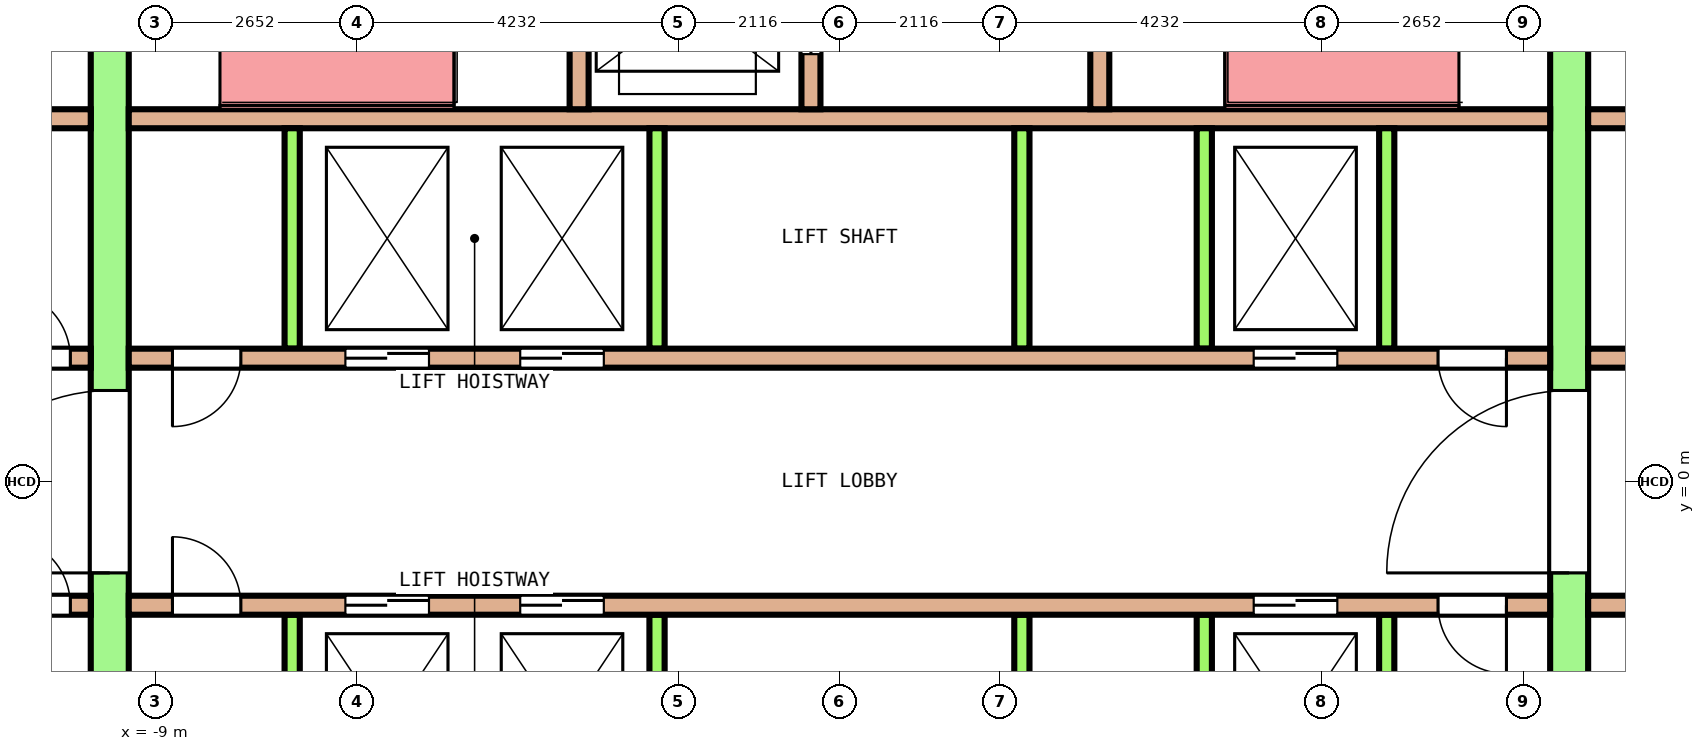
"""IFC4 building model, lengths in metres.
Left out: names, types, materials, properties, quantities, classifications, styles, units other than length and angle.
Written with IfcOpenShell. Run it as: python <this file> out.ifc"""

import sys

from ifc_helpers import new_model, si_unit, direction, frame, frame_2d, origin, place, context, subcontext, project, spatial, rectangle, extrude, element, fill, save


model = new_model("IFC4")
c1 = context("Model", 3, precision=1e-05, world=origin(), true_north=direction((0.0, 1.0)))
c2 = subcontext(c1, "Body", "Model", "MODEL_VIEW")
j1 = project(units=[si_unit("LENGTHUNIT", "METRE"), si_unit("PLANEANGLEUNIT", "RADIAN")], contexts=[c1])
p1 = place(None, origin())
s1 = spatial("IfcSite", under=j1, at=p1, CompositionType="ELEMENT")
p2 = place(p1, origin())
s2 = spatial("IfcBuilding", under=s1, at=p2, CompositionType="ELEMENT")
p3 = place(p2, frame((0.0, 0.0, 184.8)))
s3 = spatial("IfcBuildingStorey", under=s2, at=p3, CompositionType="ELEMENT", Elevation=184.8)
p4 = place(p3, frame((-9.6, -7.75, 0.0), z_axis=(0.0, 0.0, 1.0), x_axis=(0.0, 1.0, 0.0)))
e1 = element("IfcWall", 1, at=p4, inside=s3, PredefinedType="SHEAR", context=c2, shape_type="SweptSolid", body=[
    extrude(rectangle(XDim=15.5, YDim=0.5, at=frame_2d((7.75, 0.0))), origin(), (0.0, 0.0, 1.0), 4.1),
])
p5 = place(p4, frame((6.55, 0.0, 0.0)))
e2 = element("IfcOpeningElement", 2, at=p5, cuts=e1, PredefinedType="OPENING", context=c2, shape_type="SweptSolid", body=[
    extrude(rectangle(XDim=2.4, YDim=2.1, at=frame_2d((1.2, 1.05))), frame((0.0, 0.26, 0.0), z_axis=(0.0, -1.0, 0.0), x_axis=(1.0, 0.0, 0.0)), (0.0, 0.0, 1.0), 0.52),
])
p6 = place(p4, frame((13.45, 0.0, 0.0)))
e3 = element("IfcOpeningElement", 3, at=p6, cuts=e1, PredefinedType="OPENING", context=c2, shape_type="SweptSolid", body=[
    extrude(rectangle(XDim=1.2, YDim=2.1, at=frame_2d((0.6, 1.05))), frame((0.0, 0.26, 0.0), z_axis=(0.0, -1.0, 0.0), x_axis=(1.0, 0.0, 0.0)), (0.0, 0.0, 1.0), 0.52),
])
p7 = place(p4, frame((0.85, 0.0, 0.0)))
e4 = element("IfcOpeningElement", 4, at=p7, cuts=e1, PredefinedType="OPENING", context=c2, shape_type="SweptSolid", body=[
    extrude(rectangle(XDim=1.2, YDim=2.1, at=frame_2d((0.6, 1.05))), frame((0.0, 0.26, 0.0), z_axis=(0.0, -1.0, 0.0), x_axis=(1.0, 0.0, 0.0)), (0.0, 0.0, 1.0), 0.52),
])
p8 = place(p3, frame((9.6, -7.75, 0.0), z_axis=(0.0, 0.0, 1.0), x_axis=(0.0, 1.0, 0.0)))
e5 = element("IfcWall", 5, at=p8, inside=s3, PredefinedType="SHEAR", context=c2, shape_type="SweptSolid", body=[
    extrude(rectangle(XDim=15.5, YDim=0.5, at=frame_2d((7.75, 0.0))), origin(), (0.0, 0.0, 1.0), 4.1),
])
p9 = place(p8, frame((6.55, 0.0, 0.0)))
e6 = element("IfcOpeningElement", 6, at=p9, cuts=e5, PredefinedType="OPENING", context=c2, shape_type="SweptSolid", body=[
    extrude(rectangle(XDim=2.4, YDim=2.1, at=frame_2d((1.2, 1.05))), frame((0.0, 0.26, 0.0), z_axis=(0.0, -1.0, 0.0), x_axis=(1.0, 0.0, 0.0)), (0.0, 0.0, 1.0), 0.52),
])
p10 = place(p8, frame((13.45, 0.0, 0.0)))
e7 = element("IfcOpeningElement", 7, at=p10, cuts=e5, PredefinedType="OPENING", context=c2, shape_type="SweptSolid", body=[
    extrude(rectangle(XDim=1.2, YDim=2.1, at=frame_2d((0.6, 1.05))), frame((0.0, 0.26, 0.0), z_axis=(0.0, -1.0, 0.0), x_axis=(1.0, 0.0, 0.0)), (0.0, 0.0, 1.0), 0.52),
])
p11 = place(p8, frame((0.95, 0.0, 0.0)))
e8 = element("IfcOpeningElement", 8, at=p11, cuts=e5, PredefinedType="OPENING", context=c2, shape_type="SweptSolid", body=[
    extrude(rectangle(XDim=1.0, YDim=2.1, at=frame_2d((0.5, 1.05))), frame((0.0, 0.26, 0.0), z_axis=(0.0, -1.0, 0.0), x_axis=(1.0, 0.0, 0.0)), (0.0, 0.0, 1.0), 0.52),
])
p12 = place(p3, frame((-12.85, 1.625, 0.0), z_axis=(0.0, 0.0, 1.0), x_axis=(1.0, 0.0, 0.0)))
e9 = element("IfcWall", 9, at=p12, inside=s3, PredefinedType="SOLIDWALL", context=c2, shape_type="SweptSolid", body=[
    extrude(rectangle(XDim=3.0, YDim=0.25, at=frame_2d((1.5, 0.0))), origin(), (0.0, 0.0, 1.0), 4.1),
])
p13 = place(p12, frame((0.269, 0.0, 0.0)))
e10 = element("IfcOpeningElement", 10, at=p13, cuts=e9, PredefinedType="OPENING", context=c2, shape_type="SweptSolid", body=[
    extrude(rectangle(XDim=0.9, YDim=2.1, at=frame_2d((0.45, 1.05))), frame((0.0, 0.135, 0.0), z_axis=(0.0, -1.0, 0.0), x_axis=(1.0, 0.0, 0.0)), (0.0, 0.0, 1.0), 0.27),
])
p14 = place(p12, frame((1.831, 0.0, 0.0)))
e11 = element("IfcOpeningElement", 11, at=p14, cuts=e9, PredefinedType="OPENING", context=c2, shape_type="SweptSolid", body=[
    extrude(rectangle(XDim=0.9, YDim=2.1, at=frame_2d((0.45, 1.05))), frame((0.0, 0.135, 0.0), z_axis=(0.0, -1.0, 0.0), x_axis=(1.0, 0.0, 0.0)), (0.0, 0.0, 1.0), 0.27),
])
p15 = place(p3, frame((-9.35, 1.625, 0.0), z_axis=(0.0, 0.0, 1.0), x_axis=(1.0, 0.0, 0.0)))
e12 = element("IfcWall", 12, at=p15, inside=s3, PredefinedType="SOLIDWALL", context=c2, shape_type="SweptSolid", body=[
    extrude(rectangle(XDim=18.7, YDim=0.25, at=frame_2d((9.35, 0.0))), origin(), (0.0, 0.0, 1.0), 4.1),
])
p16 = place(p15, frame((2.85, 0.0, 0.0)))
e13 = element("IfcOpeningElement", 13, at=p16, cuts=e12, PredefinedType="OPENING", context=c2, shape_type="SweptSolid", body=[
    extrude(rectangle(XDim=1.1, YDim=2.1, at=frame_2d((0.55, 1.05))), frame((0.0, 0.135, 0.0), z_axis=(0.0, -1.0, 0.0), x_axis=(1.0, 0.0, 0.0)), (0.0, 0.0, 1.0), 0.27),
])
p17 = place(p15, frame((5.15, 0.0, 0.0)))
e14 = element("IfcOpeningElement", 14, at=p17, cuts=e12, PredefinedType="OPENING", context=c2, shape_type="SweptSolid", body=[
    extrude(rectangle(XDim=1.1, YDim=2.1, at=frame_2d((0.55, 1.05))), frame((0.0, 0.135, 0.0), z_axis=(0.0, -1.0, 0.0), x_axis=(1.0, 0.0, 0.0)), (0.0, 0.0, 1.0), 0.27),
])
p18 = place(p15, frame((14.8, 0.0, 0.0)))
e15 = element("IfcOpeningElement", 15, at=p18, cuts=e12, PredefinedType="OPENING", context=c2, shape_type="SweptSolid", body=[
    extrude(rectangle(XDim=1.1, YDim=2.1, at=frame_2d((0.55, 1.05))), frame((0.0, 0.135, 0.0), z_axis=(0.0, -1.0, 0.0), x_axis=(1.0, 0.0, 0.0)), (0.0, 0.0, 1.0), 0.27),
])
p19 = place(p15, frame((0.575, 0.0, 0.0)))
e16 = element("IfcOpeningElement", 16, at=p19, cuts=e12, PredefinedType="OPENING", context=c2, shape_type="SweptSolid", body=[
    extrude(rectangle(XDim=0.9, YDim=2.1, at=frame_2d((0.45, 1.05))), frame((0.0, 0.135, 0.0), z_axis=(0.0, -1.0, 0.0), x_axis=(1.0, 0.0, 0.0)), (0.0, 0.0, 1.0), 0.27),
])
p20 = place(p15, frame((17.225, 0.0, 0.0)))
e17 = element("IfcOpeningElement", 17, at=p20, cuts=e12, PredefinedType="OPENING", context=c2, shape_type="SweptSolid", body=[
    extrude(rectangle(XDim=0.9, YDim=2.1, at=frame_2d((0.45, 1.05))), frame((0.0, 0.135, 0.0), z_axis=(0.0, -1.0, 0.0), x_axis=(1.0, 0.0, 0.0)), (0.0, 0.0, 1.0), 0.27),
])
p21 = place(p3, frame((9.85, 1.625, 0.0), z_axis=(0.0, 0.0, 1.0), x_axis=(1.0, 0.0, 0.0)))
e18 = element("IfcWall", 18, at=p21, inside=s3, PredefinedType="SOLIDWALL", context=c2, shape_type="SweptSolid", body=[
    extrude(rectangle(XDim=3.0, YDim=0.25, at=frame_2d((1.5, 0.0))), origin(), (0.0, 0.0, 1.0), 4.1),
])
p22 = place(p21, frame((1.05, 0.0, 0.0)))
e19 = element("IfcOpeningElement", 19, at=p22, cuts=e18, PredefinedType="OPENING", context=c2, shape_type="SweptSolid", body=[
    extrude(rectangle(XDim=0.9, YDim=2.1, at=frame_2d((0.45, 1.05))), frame((0.0, 0.135, 0.0), z_axis=(0.0, -1.0, 0.0), x_axis=(1.0, 0.0, 0.0)), (0.0, 0.0, 1.0), 0.27),
])
p23 = place(p3, frame((-12.85, 4.775, 0.0), z_axis=(0.0, 0.0, 1.0), x_axis=(1.0, 0.0, 0.0)))
e20 = element("IfcWall", 20, at=p23, inside=s3, PredefinedType="SOLIDWALL", context=c2, shape_type="SweptSolid", body=[
    extrude(rectangle(XDim=3.0, YDim=0.25, at=frame_2d((1.5, 0.0))), origin(), (0.0, 0.0, 1.0), 4.1),
])
p24 = place(p3, frame((-9.35, 4.775, 0.0), z_axis=(0.0, 0.0, 1.0), x_axis=(1.0, 0.0, 0.0)))
e21 = element("IfcWall", 21, at=p24, inside=s3, PredefinedType="SOLIDWALL", context=c2, shape_type="SweptSolid", body=[
    extrude(rectangle(XDim=18.7, YDim=0.25, at=frame_2d((9.35, 0.0))), origin(), (0.0, 0.0, 1.0), 4.1),
])
p25 = place(p3, frame((9.85, 4.775, 0.0), z_axis=(0.0, 0.0, 1.0), x_axis=(1.0, 0.0, 0.0)))
e22 = element("IfcWall", 22, at=p25, inside=s3, PredefinedType="SOLIDWALL", context=c2, shape_type="SweptSolid", body=[
    extrude(rectangle(XDim=3.0, YDim=0.25, at=frame_2d((1.5, 0.0))), origin(), (0.0, 0.0, 1.0), 4.1),
])
for number, where, z_axis, x_axis in (
    (23, (-7.2, 1.75, 0.0), (0.0, 0.0, 1.0), (0.0, 1.0, 0.0)),
    (24, (-2.4, 1.75, 0.0), (0.0, 0.0, 1.0), (0.0, 1.0, 0.0)),
    (25, (2.4, 1.75, 0.0), (0.0, 0.0, 1.0), (0.0, 1.0, 0.0)),
    (26, (4.8, 1.75, 0.0), (0.0, 0.0, 1.0), (0.0, 1.0, 0.0)),
    (27, (7.2, 1.75, 0.0), (0.0, 0.0, 1.0), (0.0, 1.0, 0.0)),
):
    element("IfcWall", number, at=place(p3, frame(where, z_axis=z_axis, x_axis=x_axis)), inside=s3, PredefinedType="SOLIDWALL", context=c2, shape_type="SweptSolid", body=[
        extrude(rectangle(XDim=2.9, YDim=0.2, at=frame_2d((1.45, 0.0))), origin(), (0.0, 0.0, 1.0), 4.1),
    ])
p26 = place(p3, frame((-12.85, -1.625, 0.0), z_axis=(0.0, 0.0, 1.0), x_axis=(1.0, 0.0, 0.0)))
e28 = element("IfcWall", 28, at=p26, inside=s3, PredefinedType="SOLIDWALL", context=c2, shape_type="SweptSolid", body=[
    extrude(rectangle(XDim=3.0, YDim=0.25, at=frame_2d((1.5, 0.0))), origin(), (0.0, 0.0, 1.0), 4.1),
])
p27 = place(p26, frame((0.269, 0.0, 0.0)))
e29 = element("IfcOpeningElement", 29, at=p27, cuts=e28, PredefinedType="OPENING", context=c2, shape_type="SweptSolid", body=[
    extrude(rectangle(XDim=0.9, YDim=2.1, at=frame_2d((0.45, 1.05))), frame((0.0, 0.135, 0.0), z_axis=(0.0, -1.0, 0.0), x_axis=(1.0, 0.0, 0.0)), (0.0, 0.0, 1.0), 0.27),
])
p28 = place(p26, frame((1.831, 0.0, 0.0)))
e30 = element("IfcOpeningElement", 30, at=p28, cuts=e28, PredefinedType="OPENING", context=c2, shape_type="SweptSolid", body=[
    extrude(rectangle(XDim=0.9, YDim=2.1, at=frame_2d((0.45, 1.05))), frame((0.0, 0.135, 0.0), z_axis=(0.0, -1.0, 0.0), x_axis=(1.0, 0.0, 0.0)), (0.0, 0.0, 1.0), 0.27),
])
p29 = place(p3, frame((-9.35, -1.625, 0.0), z_axis=(0.0, 0.0, 1.0), x_axis=(1.0, 0.0, 0.0)))
e31 = element("IfcWall", 31, at=p29, inside=s3, PredefinedType="SOLIDWALL", context=c2, shape_type="SweptSolid", body=[
    extrude(rectangle(XDim=18.7, YDim=0.25, at=frame_2d((9.35, 0.0))), origin(), (0.0, 0.0, 1.0), 4.1),
])
p30 = place(p29, frame((2.85, 0.0, 0.0)))
e32 = element("IfcOpeningElement", 32, at=p30, cuts=e31, PredefinedType="OPENING", context=c2, shape_type="SweptSolid", body=[
    extrude(rectangle(XDim=1.1, YDim=2.1, at=frame_2d((0.55, 1.05))), frame((0.0, 0.135, 0.0), z_axis=(0.0, -1.0, 0.0), x_axis=(1.0, 0.0, 0.0)), (0.0, 0.0, 1.0), 0.27),
])
p31 = place(p29, frame((5.15, 0.0, 0.0)))
e33 = element("IfcOpeningElement", 33, at=p31, cuts=e31, PredefinedType="OPENING", context=c2, shape_type="SweptSolid", body=[
    extrude(rectangle(XDim=1.1, YDim=2.1, at=frame_2d((0.55, 1.05))), frame((0.0, 0.135, 0.0), z_axis=(0.0, -1.0, 0.0), x_axis=(1.0, 0.0, 0.0)), (0.0, 0.0, 1.0), 0.27),
])
p32 = place(p29, frame((14.8, 0.0, 0.0)))
e34 = element("IfcOpeningElement", 34, at=p32, cuts=e31, PredefinedType="OPENING", context=c2, shape_type="SweptSolid", body=[
    extrude(rectangle(XDim=1.1, YDim=2.1, at=frame_2d((0.55, 1.05))), frame((0.0, 0.135, 0.0), z_axis=(0.0, -1.0, 0.0), x_axis=(1.0, 0.0, 0.0)), (0.0, 0.0, 1.0), 0.27),
])
p33 = place(p29, frame((0.575, 0.0, 0.0)))
e35 = element("IfcOpeningElement", 35, at=p33, cuts=e31, PredefinedType="OPENING", context=c2, shape_type="SweptSolid", body=[
    extrude(rectangle(XDim=0.9, YDim=2.1, at=frame_2d((0.45, 1.05))), frame((0.0, 0.135, 0.0), z_axis=(0.0, -1.0, 0.0), x_axis=(1.0, 0.0, 0.0)), (0.0, 0.0, 1.0), 0.27),
])
p34 = place(p29, frame((17.225, 0.0, 0.0)))
e36 = element("IfcOpeningElement", 36, at=p34, cuts=e31, PredefinedType="OPENING", context=c2, shape_type="SweptSolid", body=[
    extrude(rectangle(XDim=0.9, YDim=2.1, at=frame_2d((0.45, 1.05))), frame((0.0, 0.135, 0.0), z_axis=(0.0, -1.0, 0.0), x_axis=(1.0, 0.0, 0.0)), (0.0, 0.0, 1.0), 0.27),
])
p35 = place(p3, frame((9.85, -1.625, 0.0), z_axis=(0.0, 0.0, 1.0), x_axis=(1.0, 0.0, 0.0)))
e37 = element("IfcWall", 37, at=p35, inside=s3, PredefinedType="SOLIDWALL", context=c2, shape_type="SweptSolid", body=[
    extrude(rectangle(XDim=3.0, YDim=0.25, at=frame_2d((1.5, 0.0))), origin(), (0.0, 0.0, 1.0), 4.1),
])
p36 = place(p35, frame((1.05, 0.0, 0.0)))
e38 = element("IfcOpeningElement", 38, at=p36, cuts=e37, PredefinedType="OPENING", context=c2, shape_type="SweptSolid", body=[
    extrude(rectangle(XDim=0.9, YDim=2.1, at=frame_2d((0.45, 1.05))), frame((0.0, 0.135, 0.0), z_axis=(0.0, -1.0, 0.0), x_axis=(1.0, 0.0, 0.0)), (0.0, 0.0, 1.0), 0.27),
])
for number, where, z_axis, x_axis in (
    (39, (-7.2, -4.65, 0.0), (0.0, 0.0, 1.0), (0.0, 1.0, 0.0)),
    (40, (-2.4, -4.65, 0.0), (0.0, 0.0, 1.0), (0.0, 1.0, 0.0)),
    (41, (2.4, -4.65, 0.0), (0.0, 0.0, 1.0), (0.0, 1.0, 0.0)),
    (42, (4.8, -4.65, 0.0), (0.0, 0.0, 1.0), (0.0, 1.0, 0.0)),
    (43, (7.2, -4.65, 0.0), (0.0, 0.0, 1.0), (0.0, 1.0, 0.0)),
):
    element("IfcWall", number, at=place(p3, frame(where, z_axis=z_axis, x_axis=x_axis)), inside=s3, PredefinedType="SOLIDWALL", context=c2, shape_type="SweptSolid", body=[
        extrude(rectangle(XDim=2.9, YDim=0.2, at=frame_2d((1.45, 0.0))), origin(), (0.0, 0.0, 1.0), 4.1),
    ])
p37 = place(p3, frame((-3.425, 4.9, 0.0), z_axis=(0.0, 0.0, 1.0), x_axis=(0.0, 1.0, 0.0)))
e44 = element("IfcWall", 44, at=p37, inside=s3, PredefinedType="SOLIDWALL", context=c2, shape_type="SweptSolid", body=[
    extrude(rectangle(XDim=2.85, YDim=0.25, at=frame_2d((1.425, 0.0))), origin(), (0.0, 0.0, 1.0), 4.1),
])
p38 = place(p3, frame((-0.375, 4.9, 0.0), z_axis=(0.0, 0.0, 1.0), x_axis=(0.0, 1.0, 0.0)))
e45 = element("IfcWall", 45, at=p38, inside=s3, PredefinedType="SOLIDWALL", context=c2, shape_type="SweptSolid", body=[
    extrude(rectangle(XDim=2.85, YDim=0.25, at=frame_2d((1.425, 0.0))), origin(), (0.0, 0.0, 1.0), 4.1),
])
p39 = place(p38, frame((0.725, 0.0, 0.0)))
e46 = element("IfcOpeningElement", 46, at=p39, cuts=e45, PredefinedType="OPENING", context=c2, shape_type="SweptSolid", body=[
    extrude(rectangle(XDim=1.4, YDim=2.1, at=frame_2d((0.7, 1.05))), frame((0.0, 0.135, 0.0), z_axis=(0.0, -1.0, 0.0), x_axis=(1.0, 0.0, 0.0)), (0.0, 0.0, 1.0), 0.27),
])
p40 = place(p3, frame((3.425, 4.9, 0.0), z_axis=(0.0, 0.0, 1.0), x_axis=(0.0, 1.0, 0.0)))
e47 = element("IfcWall", 47, at=p40, inside=s3, PredefinedType="SOLIDWALL", context=c2, shape_type="SweptSolid", body=[
    extrude(rectangle(XDim=2.85, YDim=0.25, at=frame_2d((1.425, 0.0))), origin(), (0.0, 0.0, 1.0), 4.1),
])
p41 = place(p16, origin())
e48 = element("IfcDoor", 48, at=p41, inside=s3, OperationType="DOUBLE_DOOR_SLIDING", PredefinedType="DOOR", context=c2, shape_type="SweptSolid", body=[
    extrude(rectangle(XDim=1.1, YDim=2.1, at=frame_2d((0.55, 1.05))), frame((0.0, 0.075, 0.0), z_axis=(0.0, -1.0, 0.0), x_axis=(1.0, 0.0, 0.0)), (0.0, 0.0, 1.0), 0.15),
])
fill(e13, e48)
p42 = place(p17, origin())
e49 = element("IfcDoor", 49, at=p42, inside=s3, OperationType="DOUBLE_DOOR_SLIDING", PredefinedType="DOOR", context=c2, shape_type="SweptSolid", body=[
    extrude(rectangle(XDim=1.1, YDim=2.1, at=frame_2d((0.55, 1.05))), frame((0.0, 0.075, 0.0), z_axis=(0.0, -1.0, 0.0), x_axis=(1.0, 0.0, 0.0)), (0.0, 0.0, 1.0), 0.15),
])
fill(e14, e49)
p43 = place(p18, origin())
e50 = element("IfcDoor", 50, at=p43, inside=s3, OperationType="DOUBLE_DOOR_SLIDING", PredefinedType="DOOR", context=c2, shape_type="SweptSolid", body=[
    extrude(rectangle(XDim=1.1, YDim=2.1, at=frame_2d((0.55, 1.05))), frame((0.0, 0.075, 0.0), z_axis=(0.0, -1.0, 0.0), x_axis=(1.0, 0.0, 0.0)), (0.0, 0.0, 1.0), 0.15),
])
fill(e15, e50)
p44 = place(p30, origin())
e51 = element("IfcDoor", 51, at=p44, inside=s3, OperationType="DOUBLE_DOOR_SLIDING", PredefinedType="DOOR", context=c2, shape_type="SweptSolid", body=[
    extrude(rectangle(XDim=1.1, YDim=2.1, at=frame_2d((0.55, 1.05))), frame((0.0, 0.075, 0.0), z_axis=(0.0, -1.0, 0.0), x_axis=(1.0, 0.0, 0.0)), (0.0, 0.0, 1.0), 0.15),
])
fill(e32, e51)
p45 = place(p31, origin())
e52 = element("IfcDoor", 52, at=p45, inside=s3, OperationType="DOUBLE_DOOR_SLIDING", PredefinedType="DOOR", context=c2, shape_type="SweptSolid", body=[
    extrude(rectangle(XDim=1.1, YDim=2.1, at=frame_2d((0.55, 1.05))), frame((0.0, 0.075, 0.0), z_axis=(0.0, -1.0, 0.0), x_axis=(1.0, 0.0, 0.0)), (0.0, 0.0, 1.0), 0.15),
])
fill(e33, e52)
p46 = place(p32, origin())
e53 = element("IfcDoor", 53, at=p46, inside=s3, OperationType="DOUBLE_DOOR_SLIDING", PredefinedType="DOOR", context=c2, shape_type="SweptSolid", body=[
    extrude(rectangle(XDim=1.1, YDim=2.1, at=frame_2d((0.55, 1.05))), frame((0.0, 0.075, 0.0), z_axis=(0.0, -1.0, 0.0), x_axis=(1.0, 0.0, 0.0)), (0.0, 0.0, 1.0), 0.15),
])
fill(e34, e53)
p47 = place(p39, origin())
e54 = element("IfcDoor", 54, at=p47, inside=s3, OperationType="DOUBLE_DOOR_SLIDING", PredefinedType="DOOR", context=c2, shape_type="SweptSolid", body=[
    extrude(rectangle(XDim=1.4, YDim=2.1, at=frame_2d((0.7, 1.05))), frame((0.0, 0.075, 0.0), z_axis=(0.0, -1.0, 0.0), x_axis=(1.0, 0.0, 0.0)), (0.0, 0.0, 1.0), 0.15),
])
fill(e46, e54)
p48 = place(p5, origin())
e55 = element("IfcDoor", 55, at=p48, inside=s3, OperationType="DOUBLE_DOOR_SINGLE_SWING", PredefinedType="DOOR", context=c2, shape_type="SweptSolid", body=[
    extrude(rectangle(XDim=2.4, YDim=2.1, at=frame_2d((1.2, 1.05))), frame((0.0, 0.2, 0.0), z_axis=(0.0, -1.0, 0.0), x_axis=(1.0, 0.0, 0.0)), (0.0, 0.0, 1.0), 0.4),
])
fill(e2, e55)
p49 = place(p9, origin())
e56 = element("IfcDoor", 56, at=p49, inside=s3, OperationType="DOUBLE_DOOR_SINGLE_SWING", PredefinedType="DOOR", context=c2, shape_type="SweptSolid", body=[
    extrude(rectangle(XDim=2.4, YDim=2.1, at=frame_2d((1.2, 1.05))), frame((0.0, 0.2, 0.0), z_axis=(0.0, -1.0, 0.0), x_axis=(1.0, 0.0, 0.0)), (0.0, 0.0, 1.0), 0.4),
])
fill(e6, e56)
p50 = place(p14, origin())
e57 = element("IfcDoor", 57, at=p50, inside=s3, OperationType="SINGLE_SWING_LEFT", PredefinedType="DOOR", context=c2, shape_type="SweptSolid", body=[
    extrude(rectangle(XDim=0.9, YDim=2.1, at=frame_2d((0.45, 1.05))), frame((0.0, 0.075, 0.0), z_axis=(0.0, -1.0, 0.0), x_axis=(1.0, 0.0, 0.0)), (0.0, 0.0, 1.0), 0.15),
])
fill(e11, e57)
p51 = place(p19, origin())
e58 = element("IfcDoor", 58, at=p51, inside=s3, OperationType="SINGLE_SWING_RIGHT", PredefinedType="DOOR", context=c2, shape_type="SweptSolid", body=[
    extrude(rectangle(XDim=0.9, YDim=2.1, at=frame_2d((0.45, 1.05))), frame((0.0, 0.075, 0.0), z_axis=(0.0, -1.0, 0.0), x_axis=(1.0, 0.0, 0.0)), (0.0, 0.0, 1.0), 0.15),
])
fill(e16, e58)
p52 = place(p20, origin())
e59 = element("IfcDoor", 59, at=p52, inside=s3, OperationType="SINGLE_SWING_LEFT", PredefinedType="DOOR", context=c2, shape_type="SweptSolid", body=[
    extrude(rectangle(XDim=0.9, YDim=2.1, at=frame_2d((0.45, 1.05))), frame((0.0, 0.075, 0.0), z_axis=(0.0, -1.0, 0.0), x_axis=(1.0, 0.0, 0.0)), (0.0, 0.0, 1.0), 0.15),
])
fill(e17, e59)
p53 = place(p28, origin())
e60 = element("IfcDoor", 60, at=p53, inside=s3, OperationType="SINGLE_SWING_RIGHT", PredefinedType="DOOR", context=c2, shape_type="SweptSolid", body=[
    extrude(rectangle(XDim=0.9, YDim=2.1, at=frame_2d((0.45, 1.05))), frame((0.0, 0.075, 0.0), z_axis=(0.0, -1.0, 0.0), x_axis=(1.0, 0.0, 0.0)), (0.0, 0.0, 1.0), 0.15),
])
fill(e30, e60)
p54 = place(p33, origin())
e61 = element("IfcDoor", 61, at=p54, inside=s3, OperationType="SINGLE_SWING_LEFT", PredefinedType="DOOR", context=c2, shape_type="SweptSolid", body=[
    extrude(rectangle(XDim=0.9, YDim=2.1, at=frame_2d((0.45, 1.05))), frame((0.0, 0.075, 0.0), z_axis=(0.0, -1.0, 0.0), x_axis=(1.0, 0.0, 0.0)), (0.0, 0.0, 1.0), 0.15),
])
fill(e35, e61)
p55 = place(p34, origin())
e62 = element("IfcDoor", 62, at=p55, inside=s3, OperationType="SINGLE_SWING_RIGHT", PredefinedType="DOOR", context=c2, shape_type="SweptSolid", body=[
    extrude(rectangle(XDim=0.9, YDim=2.1, at=frame_2d((0.45, 1.05))), frame((0.0, 0.075, 0.0), z_axis=(0.0, -1.0, 0.0), x_axis=(1.0, 0.0, 0.0)), (0.0, 0.0, 1.0), 0.15),
])
fill(e36, e62)
save(model, sys.argv[1])
